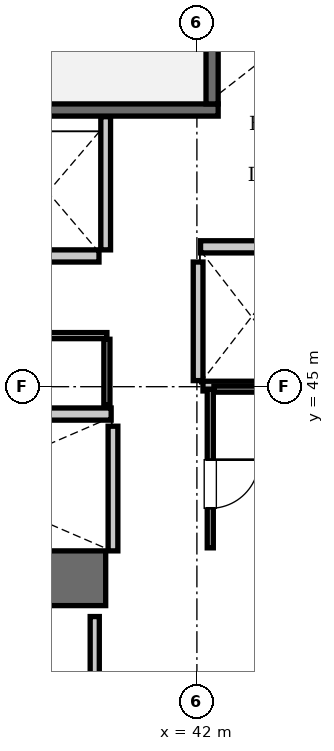
"""IFC4 building model, lengths in metres.
Left out: names, types, materials, properties, quantities, classifications, styles, units other than length and angle.
Written with IfcOpenShell. Run it as: python <this file> out.ifc"""

import sys

from ifc_helpers import new_model, si_unit, direction, frame, frame_2d, origin, place, context, subcontext, project, spatial, rectangle, extrude, element, fill, save


model = new_model("IFC4")
c1 = context("Model", 3, precision=1e-05, world=origin(), true_north=direction((0.0, 1.0)))
c2 = subcontext(c1, "Body", "Model", "MODEL_VIEW")
j1 = project(units=[si_unit("LENGTHUNIT", "METRE"), si_unit("PLANEANGLEUNIT", "RADIAN")], contexts=[c1])
p1 = place(None, origin())
s1 = spatial("IfcSite", under=j1, at=p1, CompositionType="ELEMENT")
p2 = place(p1, origin())
s2 = spatial("IfcBuilding", under=s1, at=p2, CompositionType="ELEMENT")
p3 = place(p2, frame((0.0, 0.0, 50.05)))
s3 = spatial("IfcBuildingStorey", under=s2, at=p3, CompositionType="ELEMENT", Elevation=50.05)
p4 = place(p3, frame((35.1, 41.85, 0.0), z_axis=(0.0, 0.0, 1.0), x_axis=(1.0, 0.0, 0.0)))
e1 = element("IfcWall", 1, at=p4, inside=s3, PredefinedType="SHEAR", context=c2, shape_type="SweptSolid", body=[
    extrude(rectangle(XDim=5.4, YDim=0.9, at=frame_2d((2.7, 0.0))), origin(), (0.0, 0.0, 1.0), 3.85),
])
p5 = place(p3, frame((33.25, 49.55, 0.0), z_axis=(0.0, 0.0, 1.0), x_axis=(1.0, 0.0, 0.0)))
e2 = element("IfcWall", 2, at=p5, inside=s3, PredefinedType="SOLIDWALL", context=c2, shape_type="SweptSolid", body=[
    extrude(rectangle(XDim=9.1, YDim=0.2, at=frame_2d((4.55, 0.0))), origin(), (0.0, 0.0, 1.0), 3.61),
])
p6 = place(p3, frame((42.25, 49.65, 0.0), z_axis=(0.0, 0.0, 1.0), x_axis=(0.0, 1.0, 0.0)))
e3 = element("IfcWall", 3, at=p6, inside=s3, PredefinedType="SOLIDWALL", context=c2, shape_type="SweptSolid", body=[
    extrude(rectangle(XDim=3.45, YDim=0.2, at=frame_2d((1.725, 0.0))), origin(), (0.0, 0.0, 1.0), 3.61),
])
p7 = place(p3, frame((42.06, 47.3, 0.0), z_axis=(0.0, 0.0, 1.0), x_axis=(1.0, 0.0, 0.0)))
e4 = element("IfcWall", 4, at=p7, inside=s3, PredefinedType="SOLIDWALL", context=c2, shape_type="SweptSolid", body=[
    extrude(rectangle(XDim=1.68, YDim=0.2, at=frame_2d((0.84, 0.0))), origin(), (0.0, 0.0, 1.0), 3.61),
])
p8 = place(p3, frame((38.91, 44.55, 0.0), z_axis=(0.0, 0.0, 1.0), x_axis=(1.0, 0.0, 0.0)))
e5 = element("IfcWall", 5, at=p8, inside=s3, PredefinedType="SOLIDWALL", context=c2, shape_type="SweptSolid", body=[
    extrude(rectangle(XDim=1.68, YDim=0.2, at=frame_2d((0.84, 0.0))), origin(), (0.0, 0.0, 1.0), 3.61),
])
p9 = place(p3, frame((38.71, 47.15, 0.0), z_axis=(0.0, 0.0, 1.0), x_axis=(1.0, 0.0, 0.0)))
e6 = element("IfcWall", 6, at=p9, inside=s3, PredefinedType="SOLIDWALL", context=c2, shape_type="SweptSolid", body=[
    extrude(rectangle(XDim=1.68, YDim=0.2, at=frame_2d((0.84, 0.0))), origin(), (0.0, 0.0, 1.0), 3.61),
])
p10 = place(p3, frame((42.02, 45.1, 0.0), z_axis=(0.0, 0.0, 1.0), x_axis=(0.0, 1.0, 0.0)))
e7 = element("IfcWall", 7, at=p10, inside=s3, PredefinedType="SOLIDWALL", context=c2, shape_type="SweptSolid", body=[
    extrude(rectangle(XDim=1.95, YDim=0.16, at=frame_2d((0.975, 0.0))), origin(), (0.0, 0.0, 1.0), 3.61),
])
p11 = place(p3, frame((42.1, 45.01, 0.0), z_axis=(0.0, 0.0, 1.0), x_axis=(1.0, 0.0, 0.0)))
e8 = element("IfcWall", 8, at=p11, inside=s3, PredefinedType="SOLIDWALL", context=c2, shape_type="SweptSolid", body=[
    extrude(rectangle(XDim=3.45, YDim=0.16, at=frame_2d((1.725, 0.0))), origin(), (0.0, 0.0, 1.0), 3.61),
])
p12 = place(p3, frame((40.62, 42.3, 0.0), z_axis=(0.0, 0.0, 1.0), x_axis=(0.0, 1.0, 0.0)))
e9 = element("IfcWall", 9, at=p12, inside=s3, PredefinedType="SOLIDWALL", context=c2, shape_type="SweptSolid", body=[
    extrude(rectangle(XDim=2.05, YDim=0.16, at=frame_2d((1.025, 0.0))), origin(), (0.0, 0.0, 1.0), 3.61),
])
p13 = place(p3, frame((40.5, 47.25, 0.0), z_axis=(0.0, 0.0, 1.0), x_axis=(0.0, 1.0, 0.0)))
e10 = element("IfcWall", 10, at=p13, inside=s3, PredefinedType="SOLIDWALL", context=c2, shape_type="SweptSolid", body=[
    extrude(rectangle(XDim=2.19, YDim=0.16, at=frame_2d((1.095, 0.0))), origin(), (0.0, 0.0, 1.0), 3.61),
])
p14 = place(p3, frame((38.02, 45.84, 0.0), z_axis=(0.0, 0.0, 1.0), x_axis=(1.0, 0.0, 0.0)))
e11 = element("IfcWall", 11, at=p14, inside=s3, PredefinedType="PARTITIONING", context=c2, shape_type="SweptSolid", body=[
    extrude(rectangle(XDim=2.5, YDim=0.1, at=frame_2d((1.25, 0.0))), origin(), (0.0, 0.0, 1.0), 3.61),
])
p15 = place(p14, frame((0.75, 0.0, 0.0)))
e12 = element("IfcOpeningElement", 12, at=p15, cuts=e11, PredefinedType="OPENING", context=c2, shape_type="SweptSolid", body=[
    extrude(rectangle(XDim=0.8, YDim=2.05, at=frame_2d((0.4, 1.025))), frame((0.0, 0.06, 0.0), z_axis=(0.0, -1.0, 0.0), x_axis=(1.0, 0.0, 0.0)), (0.0, 0.0, 1.0), 0.12),
])
p16 = place(p3, frame((40.52, 44.7, 0.0), z_axis=(0.0, 0.0, 1.0), x_axis=(0.0, 1.0, 0.0)))
e13 = element("IfcWall", 13, at=p16, inside=s3, PredefinedType="PARTITIONING", context=c2, shape_type="SweptSolid", body=[
    extrude(rectangle(XDim=1.08, YDim=0.1, at=frame_2d((0.54, 0.0))), origin(), (0.0, 0.0, 1.0), 3.61),
])
p17 = place(p3, frame((42.22, 42.35, 0.0), z_axis=(0.0, 0.0, 1.0), x_axis=(0.0, 1.0, 0.0)))
e14 = element("IfcWall", 14, at=p17, inside=s3, PredefinedType="PARTITIONING", context=c2, shape_type="SweptSolid", body=[
    extrude(rectangle(XDim=2.61, YDim=0.1, at=frame_2d((1.305, 0.0))), origin(), (0.0, 0.0, 1.0), 3.61),
])
p18 = place(p17, frame((0.65, 0.0, 0.0)))
e15 = element("IfcOpeningElement", 15, at=p18, cuts=e14, PredefinedType="OPENING", context=c2, shape_type="SweptSolid", body=[
    extrude(rectangle(XDim=0.8, YDim=2.05, at=frame_2d((0.4, 1.025))), frame((0.0, 0.06, 0.0), z_axis=(0.0, -1.0, 0.0), x_axis=(1.0, 0.0, 0.0)), (0.0, 0.0, 1.0), 0.12),
])
p19 = place(p3, frame((42.28, 44.96, 0.0), z_axis=(0.0, 0.0, 1.0), x_axis=(1.0, 0.0, 0.0)))
e16 = element("IfcWall", 16, at=p19, inside=s3, PredefinedType="PARTITIONING", context=c2, shape_type="SweptSolid", body=[
    extrude(rectangle(XDim=1.3, YDim=0.1, at=frame_2d((0.65, 0.0))), origin(), (0.0, 0.0, 1.0), 3.61),
])
p20 = place(p3, frame((40.32, 38.38, 0.0), z_axis=(0.0, 0.0, 1.0), x_axis=(0.0, 1.0, 0.0)))
e17 = element("IfcWall", 17, at=p20, inside=s3, PredefinedType="PARTITIONING", context=c2, shape_type="SweptSolid", body=[
    extrude(rectangle(XDim=2.84, YDim=0.15, at=frame_2d((1.42, 0.0))), origin(), (0.0, 0.0, 1.0), 3.61),
])
p21 = place(p18, frame((0.8, 0.0, 0.0), z_axis=(0.0, 0.0, 1.0), x_axis=(-1.0, 0.0, 0.0)))
e18 = element("IfcDoor", 18, at=p21, inside=s3, OperationType="SINGLE_SWING_LEFT", PredefinedType="DOOR", context=c2, shape_type="SweptSolid", body=[
    extrude(rectangle(XDim=0.8, YDim=2.05, at=frame_2d((0.4, 1.025))), frame((0.0, 0.025, 0.0), z_axis=(0.0, -1.0, 0.0), x_axis=(1.0, 0.0, 0.0)), (0.0, 0.0, 1.0), 0.05),
])
fill(e15, e18)
save(model, sys.argv[1])
